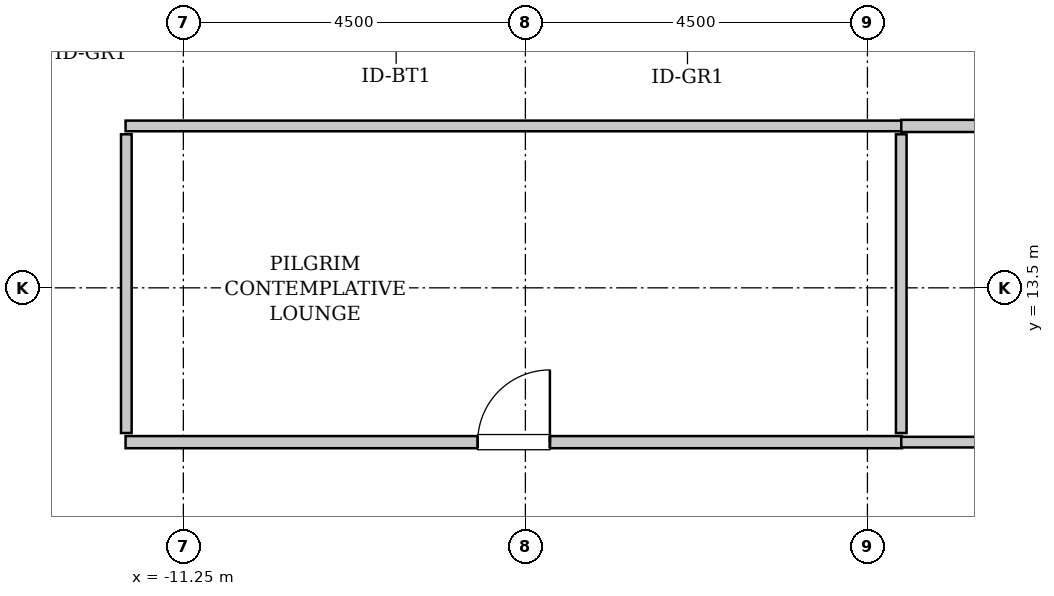
"""IFC4 building model, lengths in metres.
Left out: names, types, materials, properties, quantities, classifications, styles, units other than length and angle.
Written with IfcOpenShell. Run it as: python <this file> out.ifc"""

import sys

from ifc_helpers import new_model, si_unit, direction, frame, frame_2d, origin, place, context, subcontext, project, spatial, rectangle, extrude, source, transform, mapped, element, fill, save


model = new_model("IFC4")
c1 = context("Model", 3, precision=1e-05, world=origin(), true_north=direction((0.0, 1.0)))
c2 = subcontext(c1, "Body", "Model", "MODEL_VIEW")
j1 = project(units=[si_unit("LENGTHUNIT", "METRE"), si_unit("PLANEANGLEUNIT", "RADIAN")], contexts=[c1])
p1 = place(None, origin())
s1 = spatial("IfcSite", under=j1, at=p1, CompositionType="ELEMENT")
p2 = place(p1, origin())
s2 = spatial("IfcBuilding", under=s1, at=p2, CompositionType="ELEMENT")
p3 = place(p2, frame((0.0, 0.0, 237.0)))
s3 = spatial("IfcBuildingStorey", under=s2, at=p3, CompositionType="ELEMENT", Elevation=237.0)
m1 = source(origin(), c2, "Body", "SweptSolid", [
    extrude(rectangle(XDim=10.215, YDim=0.16, at=frame_2d((5.107, 0.0))), origin(), (0.0, 0.0, 1.0), 3.535),
])
p4 = place(p3, frame((-12.01, 11.47, 0.0), z_axis=(0.0, 0.0, 1.0), x_axis=(1.0, 0.0, 0.0)))
e1 = element("IfcWall", 1, at=p4, inside=s3, PredefinedType="PARTITIONING", context=c2, shape_type="MappedRepresentation", body=[
    mapped(m1, transform((0.0, 0.0, 0.0), x_axis=(1.0, 0.0, 0.0), y_axis=(0.0, 1.0, 0.0), z_axis=(0.0, 0.0, 1.0), scale=1.0)),
])
p5 = place(p4, frame((4.633, 0.0, 0.0)))
e2 = element("IfcOpeningElement", 2, at=p5, cuts=e1, PredefinedType="OPENING", context=c2, shape_type="SweptSolid", body=[
    extrude(rectangle(XDim=0.95, YDim=2.1, at=frame_2d((0.475, 1.05))), frame((0.0, 0.09, 0.0), z_axis=(0.0, -1.0, 0.0), x_axis=(1.0, 0.0, 0.0)), (0.0, 0.0, 1.0), 0.18),
])
m2 = source(origin(), c2, "Body", "SweptSolid", [
    extrude(rectangle(XDim=10.215, YDim=0.14, at=frame_2d((5.107, 0.0))), origin(), (0.0, 0.0, 1.0), 3.535),
])
p6 = place(p3, frame((-12.01, 15.63, 0.0), z_axis=(0.0, 0.0, 1.0), x_axis=(1.0, 0.0, 0.0)))
e3 = element("IfcWall", 3, at=p6, inside=s3, PredefinedType="PARTITIONING", context=c2, shape_type="MappedRepresentation", body=[
    mapped(m2, transform((0.0, 0.0, 0.0), x_axis=(1.0, 0.0, 0.0), y_axis=(0.0, 1.0, 0.0), z_axis=(0.0, 0.0, 1.0), scale=1.0)),
])
m3 = source(origin(), c2, "Body", "SweptSolid", [
    extrude(rectangle(XDim=3.93, YDim=0.14, at=frame_2d((1.965, 0.0))), origin(), (0.0, 0.0, 1.0), 3.535),
])
for number, where, z_axis, x_axis in (
    (4, (-12.0, 11.59, 0.0), (0.0, 0.0, 1.0), (0.0, 1.0, 0.0)),
    (5, (-1.805, 11.59, 0.0), (0.0, 0.0, 1.0), (0.0, 1.0, 0.0)),
):
    element("IfcWall", number, at=place(p3, frame(where, z_axis=z_axis, x_axis=x_axis)), inside=s3, PredefinedType="PARTITIONING", context=c2, shape_type="MappedRepresentation", body=[
        mapped(m3, transform((0.0, 0.0, 0.0), x_axis=(1.0, 0.0, 0.0), y_axis=(0.0, 1.0, 0.0), z_axis=(0.0, 0.0, 1.0), scale=1.0)),
    ])
m4 = source(origin(), c2, "Body", "SweptSolid", [
    extrude(rectangle(XDim=8.01, YDim=0.16, at=frame_2d((4.005, 0.0))), origin(), (0.0, 0.0, 1.0), 3.535),
])
p7 = place(p3, frame((-1.805, 15.63, 0.0), z_axis=(0.0, 0.0, 1.0), x_axis=(1.0, 0.0, 0.0)))
e6 = element("IfcWall", 6, at=p7, inside=s3, PredefinedType="PARTITIONING", context=c2, shape_type="MappedRepresentation", body=[
    mapped(m4, transform((0.0, 0.0, 0.0), x_axis=(1.0, 0.0, 0.0), y_axis=(0.0, 1.0, 0.0), z_axis=(0.0, 0.0, 1.0), scale=1.0)),
])
p8 = place(p7, frame((3.53, 0.0, 0.0)))
e7 = element("IfcOpeningElement", 7, at=p8, cuts=e6, PredefinedType="OPENING", context=c2, shape_type="SweptSolid", body=[
    extrude(rectangle(XDim=0.95, YDim=2.1, at=frame_2d((0.475, 1.05))), frame((0.0, 0.09, 0.0), z_axis=(0.0, -1.0, 0.0), x_axis=(1.0, 0.0, 0.0)), (0.0, 0.0, 1.0), 0.18),
])
m5 = source(origin(), c2, "Body", "SweptSolid", [
    extrude(rectangle(XDim=8.01, YDim=0.14, at=frame_2d((4.005, 0.0))), origin(), (0.0, 0.0, 1.0), 3.535),
])
p9 = place(p3, frame((-1.805, 11.47, 0.0), z_axis=(0.0, 0.0, 1.0), x_axis=(1.0, 0.0, 0.0)))
e8 = element("IfcWall", 8, at=p9, inside=s3, PredefinedType="PARTITIONING", context=c2, shape_type="MappedRepresentation", body=[
    mapped(m5, transform((0.0, 0.0, 0.0), x_axis=(1.0, 0.0, 0.0), y_axis=(0.0, 1.0, 0.0), z_axis=(0.0, 0.0, 1.0), scale=1.0)),
])
m6 = source(origin(), c2, "Body", "SweptSolid", [
    extrude(rectangle(XDim=0.95, YDim=2.1, at=frame_2d((0.475, 1.05))), frame((0.0, 0.025, 0.0), z_axis=(0.0, -1.0, 0.0), x_axis=(1.0, 0.0, 0.0)), (0.0, 0.0, 1.0), 0.05),
])
p10 = place(p5, origin())
e9 = element("IfcDoor", 9, at=p10, inside=s3, OperationType="SINGLE_SWING_RIGHT", PredefinedType="DOOR", context=c2, shape_type="MappedRepresentation", body=[
    mapped(m6, transform((0.0, 0.0, 0.0), x_axis=(1.0, 0.0, 0.0), y_axis=(0.0, 1.0, 0.0), z_axis=(0.0, 0.0, 1.0), scale=1.0)),
])
fill(e2, e9)
save(model, sys.argv[1])
